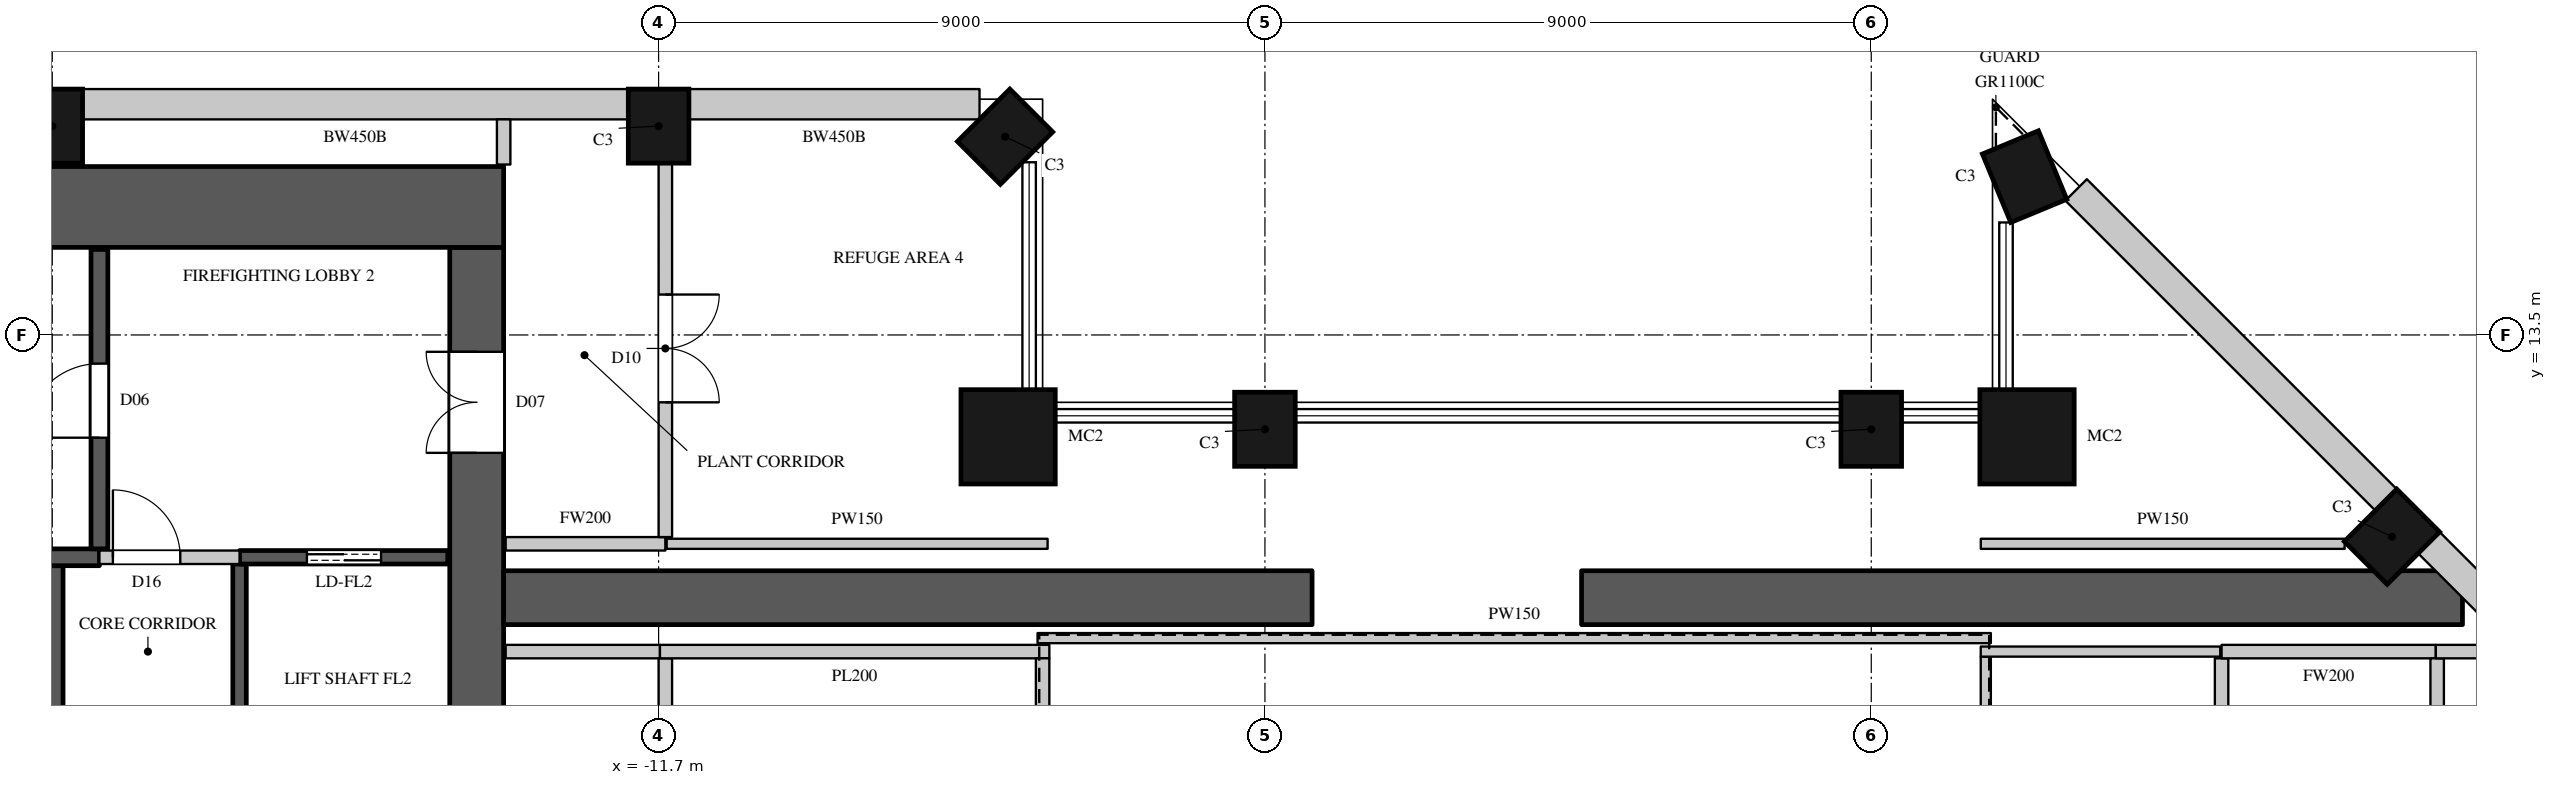
"""IFC4 building model, lengths in metres.
Left out: names, types, materials, properties, quantities, classifications, styles, units other than length and angle.
Written with IfcOpenShell. Run it as: python <this file> out.ifc"""

import sys

from ifc_helpers import new_model, si_unit, direction, frame, frame_2d, origin, origin_2d, place, context, subcontext, project, spatial, rectangle, circle, extrude, element, fill, save


model = new_model("IFC4")
c1 = context("Model", 3, precision=1e-05, world=origin(), true_north=direction((0.0, 1.0)))
c2 = subcontext(c1, "Body", "Model", "MODEL_VIEW")
j1 = project(units=[si_unit("LENGTHUNIT", "METRE"), si_unit("PLANEANGLEUNIT", "RADIAN")], contexts=[c1])
p1 = place(None, origin())
s1 = spatial("IfcSite", under=j1, at=p1, CompositionType="ELEMENT")
p2 = place(p1, origin())
s2 = spatial("IfcBuilding", under=s1, at=p2, CompositionType="ELEMENT")
p3 = place(p2, frame((0.0, 0.0, 238.4)))
s3 = spatial("IfcBuildingStorey", under=s2, at=p3, CompositionType="ELEMENT", Elevation=238.4)
for number, where, z_axis, x_axis in (
    (1, (14.029, 10.505, 0.0), (0.0, 0.0, 1.0), (-0.707, 0.707, 0.0)),
    (2, (8.576, 15.85, 0.0), (0.0, 0.0, 1.0), (-0.924, -0.383, 0.0)),
):
    element("IfcColumn", number, at=place(p3, frame(where, z_axis=z_axis, x_axis=x_axis)), inside=s3, PredefinedType="COLUMN", context=c2, shape_type="SweptSolid", body=[
        extrude(rectangle(XDim=0.9, YDim=1.1, at=origin_2d()), origin(), (0.0, 0.0, 1.0), 5.0),
    ])
p4 = place(p3, frame((8.612, 11.988, 0.0), z_axis=(0.0, 0.0, 1.0), x_axis=(1.0, 0.0, 0.0)))
e3 = element("IfcColumn", 3, at=p4, inside=s3, PredefinedType="COLUMN", context=c2, shape_type="SweptSolid", body=[
    extrude(circle(Radius=0.7, at=origin_2d()), origin(), (0.0, 0.0, 1.0), 5.0),
])
for number, where, z_axis, x_axis in (
    (4, (6.3, 12.1, 0.0), (0.0, 0.0, 1.0), (-1.0, 0.0, 0.0)),
    (5, (-2.7, 12.1, 0.0), (0.0, 0.0, 1.0), (-1.0, 0.0, 0.0)),
):
    element("IfcColumn", number, at=place(p3, frame(where, z_axis=z_axis, x_axis=x_axis)), inside=s3, PredefinedType="COLUMN", context=c2, shape_type="SweptSolid", body=[
        extrude(rectangle(XDim=0.9, YDim=1.1, at=origin_2d()), origin(), (0.0, 0.0, 1.0), 5.0),
    ])
p5 = place(p3, frame((-6.512, 11.988, 0.0), z_axis=(0.0, 0.0, 1.0), x_axis=(1.0, 0.0, 0.0)))
e6 = element("IfcColumn", 6, at=p5, inside=s3, PredefinedType="COLUMN", context=c2, shape_type="SweptSolid", body=[
    extrude(circle(Radius=0.7, at=origin_2d()), origin(), (0.0, 0.0, 1.0), 5.0),
])
for number, where, z_axis, x_axis in (
    (7, (-6.557, 16.443, 0.0), (0.0, 0.0, 1.0), (-0.707, 0.707, 0.0)),
    (8, (-11.7, 16.6, 0.0), (0.0, 0.0, 1.0), (-1.0, 0.0, 0.0)),
    (9, (-20.7, 16.6, 0.0), (0.0, 0.0, 1.0), (-1.0, 0.0, 0.0)),
):
    element("IfcColumn", number, at=place(p3, frame(where, z_axis=z_axis, x_axis=x_axis)), inside=s3, PredefinedType="COLUMN", context=c2, shape_type="SweptSolid", body=[
        extrude(rectangle(XDim=0.9, YDim=1.1, at=origin_2d()), origin(), (0.0, 0.0, 1.0), 5.0),
    ])
p6 = place(p3, frame((-14.0, 9.6, 0.0), z_axis=(0.0, 0.0, 1.0), x_axis=(1.0, 0.0, 0.0)))
e10 = element("IfcWall", 10, at=p6, inside=s3, PredefinedType="SOLIDWALL", context=c2, shape_type="SweptSolid", body=[
    extrude(rectangle(XDim=12.0, YDim=0.8, at=frame_2d((6.0, 0.0))), origin(), (0.0, 0.0, 1.0), 4.7),
])
p7 = place(p3, frame((2.0, 9.6, 0.0), z_axis=(0.0, 0.0, 1.0), x_axis=(1.0, 0.0, 0.0)))
e11 = element("IfcWall", 11, at=p7, inside=s3, PredefinedType="SOLIDWALL", context=c2, shape_type="SweptSolid", body=[
    extrude(rectangle(XDim=13.076, YDim=0.8, at=frame_2d((6.538, 0.0))), origin(), (0.0, 0.0, 1.0), 4.7),
])
p8 = place(p3, frame((19.615, 5.379, 0.0), z_axis=(0.0, 0.0, 1.0), x_axis=(-0.707089646058, 0.7071239159, 0.0)))
e12 = element("IfcWall", 12, at=p8, inside=s3, PredefinedType="SOLIDWALL", context=c2, shape_type="SweptSolid", body=[
    extrude(rectangle(XDim=7.124, YDim=0.45, at=frame_2d((3.562, 0.0))), origin(), (0.0, 0.0, 1.0), 4.7),
])
p9 = place(p3, frame((13.941, 11.053, 0.0), z_axis=(0.0, 0.0, 1.0), x_axis=(-0.707106781187, 0.707106781187, 0.0)))
e13 = element("IfcWall", 13, at=p9, inside=s3, PredefinedType="SOLIDWALL", context=c2, shape_type="SweptSolid", body=[
    extrude(rectangle(XDim=6.505, YDim=0.45, at=frame_2d((3.252, 0.0))), origin(), (0.0, 0.0, 1.0), 4.7),
])
p10 = place(p3, frame((-6.936, 16.925, 0.0), z_axis=(0.0, 0.0, 1.0), x_axis=(-1.0, 0.0, 0.0)))
e14 = element("IfcWall", 14, at=p10, inside=s3, PredefinedType="SOLIDWALL", context=c2, shape_type="SweptSolid", body=[
    extrude(rectangle(XDim=4.314, YDim=0.45, at=frame_2d((2.157, 0.0))), origin(), (0.0, 0.0, 1.0), 4.7),
])
p11 = place(p3, frame((-12.15, 16.925, 0.0), z_axis=(0.0, 0.0, 1.0), x_axis=(-1.0, 0.0, 0.0)))
e15 = element("IfcWall", 15, at=p11, inside=s3, PredefinedType="SOLIDWALL", context=c2, shape_type="SweptSolid", body=[
    extrude(rectangle(XDim=8.1, YDim=0.45, at=frame_2d((4.05, 0.0))), origin(), (0.0, 0.0, 1.0), 4.7),
])
p12 = place(p3, frame((-30.0, 15.4, 0.0), z_axis=(0.0, 0.0, 1.0), x_axis=(1.0, 0.0, 0.0)))
e16 = element("IfcWall", 16, at=p12, inside=s3, PredefinedType="SHEAR", context=c2, shape_type="SweptSolid", body=[
    extrude(rectangle(XDim=16.0, YDim=1.2, at=frame_2d((8.0, 0.0))), origin(), (0.0, 0.0, 1.0), 5.0),
])
p13 = place(p3, frame((-14.4, -14.8, 0.0), z_axis=(0.0, 0.0, 1.0), x_axis=(0.0, 1.0, 0.0)))
e17 = element("IfcWall", 17, at=p13, inside=s3, PredefinedType="SHEAR", context=c2, shape_type="SweptSolid", body=[
    extrude(rectangle(XDim=29.6, YDim=0.8, at=frame_2d((14.8, 0.0))), origin(), (0.0, 0.0, 1.0), 5.0),
])
p14 = place(p13, frame((1.55, 0.0, 0.0)))
e18 = element("IfcOpeningElement", 18, at=p14, cuts=e17, PredefinedType="OPENING", context=c2, shape_type="SweptSolid", body=[
    extrude(rectangle(XDim=1.5, YDim=2.4, at=frame_2d((0.75, 1.2))), frame((0.0, 0.41, 0.0), z_axis=(0.0, -1.0, 0.0), x_axis=(1.0, 0.0, 0.0)), (0.0, 0.0, 1.0), 0.82),
])
p15 = place(p13, frame((26.55, 0.0, 0.0)))
e19 = element("IfcOpeningElement", 19, at=p15, cuts=e17, PredefinedType="OPENING", context=c2, shape_type="SweptSolid", body=[
    extrude(rectangle(XDim=1.5, YDim=2.4, at=frame_2d((0.75, 1.2))), frame((0.0, 0.41, 0.0), z_axis=(0.0, -1.0, 0.0), x_axis=(1.0, 0.0, 0.0)), (0.0, 0.0, 1.0), 0.82),
])
p16 = place(p13, frame((8.45, 0.0, 0.0)))
e20 = element("IfcOpeningElement", 20, at=p16, cuts=e17, PredefinedType="OPENING", context=c2, shape_type="SweptSolid", body=[
    extrude(rectangle(XDim=1.5, YDim=2.4, at=frame_2d((0.75, 1.2))), frame((0.0, 0.41, 0.0), z_axis=(0.0, -1.0, 0.0), x_axis=(1.0, 0.0, 0.0)), (0.0, 0.0, 1.0), 0.82),
])
p17 = place(p13, frame((19.65, 0.0, 0.0)))
e21 = element("IfcOpeningElement", 21, at=p17, cuts=e17, PredefinedType="OPENING", context=c2, shape_type="SweptSolid", body=[
    extrude(rectangle(XDim=1.5, YDim=2.4, at=frame_2d((0.75, 1.2))), frame((0.0, 0.41, 0.0), z_axis=(0.0, -1.0, 0.0), x_axis=(1.0, 0.0, 0.0)), (0.0, 0.0, 1.0), 0.82),
])
p18 = place(p13, frame((14.5, 0.0, 0.0)))
e22 = element("IfcOpeningElement", 22, at=p18, cuts=e17, PredefinedType="OPENING", context=c2, shape_type="SweptSolid", body=[
    extrude(rectangle(XDim=0.6, YDim=2.0, at=frame_2d((0.3, 1.0))), frame((0.0, 0.41, 0.0), z_axis=(0.0, -1.0, 0.0), x_axis=(1.0, 0.0, 0.0)), (0.0, 0.0, 1.0), 0.82),
])
p19 = place(p3, frame((-20.0, 10.2, 0.0), z_axis=(0.0, 0.0, 1.0), x_axis=(1.0, 0.0, 0.0)))
e23 = element("IfcWall", 23, at=p19, inside=s3, PredefinedType="PARTITIONING", context=c2, shape_type="SweptSolid", body=[
    extrude(rectangle(XDim=2.08, YDim=0.2, at=frame_2d((1.04, 0.0))), origin(), (0.0, 0.0, 1.0), 4.7),
])
p20 = place(p19, frame((0.2, 0.0, 0.0)))
e24 = element("IfcOpeningElement", 24, at=p20, cuts=e23, PredefinedType="OPENING", context=c2, shape_type="SweptSolid", body=[
    extrude(rectangle(XDim=1.0, YDim=2.2, at=frame_2d((0.5, 1.1))), frame((0.0, 0.11, 0.0), z_axis=(0.0, -1.0, 0.0), x_axis=(1.0, 0.0, 0.0)), (0.0, 0.0, 1.0), 0.22),
])
p21 = place(p3, frame((-13.97, 8.8, 0.0), z_axis=(0.0, 0.0, 1.0), x_axis=(1.0, 0.0, 0.0)))
e25 = element("IfcWall", 25, at=p21, inside=s3, PredefinedType="PARTITIONING", context=c2, shape_type="SweptSolid", body=[
    extrude(rectangle(XDim=2.29, YDim=0.2, at=frame_2d((1.145, 0.0))), origin(), (0.0, 0.0, 1.0), 4.7),
])
p22 = place(p3, frame((-13.97, 10.4, 0.0), z_axis=(0.0, 0.0, 1.0), x_axis=(1.0, 0.0, 0.0)))
e26 = element("IfcWall", 26, at=p22, inside=s3, PredefinedType="PARTITIONING", context=c2, shape_type="SweptSolid", body=[
    extrude(rectangle(XDim=2.37, YDim=0.2, at=frame_2d((1.185, 0.0))), origin(), (0.0, 0.0, 1.0), 4.7),
])
p23 = place(p3, frame((-11.6, 10.5, 0.0), z_axis=(0.0, 0.0, 1.0), x_axis=(0.0, 1.0, 0.0)))
e27 = element("IfcWall", 27, at=p23, inside=s3, PredefinedType="PARTITIONING", context=c2, shape_type="SweptSolid", body=[
    extrude(rectangle(XDim=5.55, YDim=0.2, at=frame_2d((2.775, 0.0))), origin(), (0.0, 0.0, 1.0), 4.7),
])
p24 = place(p23, frame((2.0, 0.0, 0.0)))
e28 = element("IfcOpeningElement", 28, at=p24, cuts=e27, PredefinedType="OPENING", context=c2, shape_type="SweptSolid", body=[
    extrude(rectangle(XDim=1.6, YDim=2.4, at=frame_2d((0.8, 1.2))), frame((0.0, 0.11, 0.0), z_axis=(0.0, -1.0, 0.0), x_axis=(1.0, 0.0, 0.0)), (0.0, 0.0, 1.0), 0.22),
])
p25 = place(p3, frame((11.5, -8.7, 0.0), z_axis=(0.0, 0.0, 1.0), x_axis=(0.0, 1.0, 0.0)))
e29 = element("IfcWall", 29, at=p25, inside=s3, PredefinedType="PARTITIONING", context=c2, shape_type="SweptSolid", body=[
    extrude(rectangle(XDim=17.4, YDim=0.2, at=frame_2d((8.7, 0.0))), origin(), (0.0, 0.0, 1.0), 4.7),
])
p26 = place(p25, frame((7.9, 0.0, 0.0)))
e30 = element("IfcOpeningElement", 30, at=p26, cuts=e29, PredefinedType="OPENING", context=c2, shape_type="SweptSolid", body=[
    extrude(rectangle(XDim=1.6, YDim=2.4, at=frame_2d((0.8, 1.2))), frame((0.0, 0.11, 0.0), z_axis=(0.0, -1.0, 0.0), x_axis=(1.0, 0.0, 0.0)), (0.0, 0.0, 1.0), 0.22),
])
p27 = place(p3, frame((11.5, 8.8, 0.0), z_axis=(0.0, 0.0, 1.0), x_axis=(1.0, 0.0, 0.0)))
e31 = element("IfcWall", 31, at=p27, inside=s3, PredefinedType="PARTITIONING", context=c2, shape_type="SweptSolid", body=[
    extrude(rectangle(XDim=3.18, YDim=0.2, at=frame_2d((1.59, 0.0))), origin(), (0.0, 0.0, 1.0), 4.7),
])
p28 = place(p3, frame((-11.58, 10.4, 0.0), z_axis=(0.0, 0.0, 1.0), x_axis=(1.0, 0.0, 0.0)))
e32 = element("IfcWall", 32, at=p28, inside=s3, PredefinedType="PARTITIONING", context=c2, shape_type="SweptSolid", body=[
    extrude(rectangle(XDim=5.654, YDim=0.15, at=frame_2d((2.827, 0.0))), origin(), (0.0, 0.0, 1.0), 4.7),
])
p29 = place(p3, frame((-6.075, 9.0, 0.0), z_axis=(0.0, 0.0, 1.0), x_axis=(1.0, 0.0, 0.0)))
e33 = element("IfcWall", 33, at=p29, inside=s3, PredefinedType="PARTITIONING", context=c2, shape_type="SweptSolid", body=[
    extrude(rectangle(XDim=14.15, YDim=0.15, at=frame_2d((7.075, 0.0))), origin(), (0.0, 0.0, 1.0), 4.7),
])
p30 = place(p3, frame((8.0, -8.725, 0.0), z_axis=(0.0, 0.0, 1.0), x_axis=(0.0, 1.0, 0.0)))
e34 = element("IfcWall", 34, at=p30, inside=s3, PredefinedType="PARTITIONING", context=c2, shape_type="SweptSolid", body=[
    extrude(rectangle(XDim=17.45, YDim=0.15, at=frame_2d((8.725, 0.0))), origin(), (0.0, 0.0, 1.0), 4.7),
])
p31 = place(p3, frame((7.925, 8.8, 0.0), z_axis=(0.0, 0.0, 1.0), x_axis=(1.0, 0.0, 0.0)))
e35 = element("IfcWall", 35, at=p31, inside=s3, PredefinedType="PARTITIONING", context=c2, shape_type="SweptSolid", body=[
    extrude(rectangle(XDim=3.555, YDim=0.15, at=frame_2d((1.777, 0.0))), origin(), (0.0, 0.0, 1.0), 4.7),
])
p32 = place(p3, frame((7.926, 10.4, 0.0), z_axis=(0.0, 0.0, 1.0), x_axis=(1.0, 0.0, 0.0)))
e36 = element("IfcWall", 36, at=p32, inside=s3, PredefinedType="PARTITIONING", context=c2, shape_type="SweptSolid", body=[
    extrude(rectangle(XDim=5.4, YDim=0.15, at=frame_2d((2.7, 0.0))), origin(), (0.0, 0.0, 1.0), 4.7),
])
p33 = place(p3, frame((-14.0, 16.03, 0.0), z_axis=(0.0, 0.0, 1.0), x_axis=(0.0, 1.0, 0.0)))
e37 = element("IfcWall", 37, at=p33, inside=s3, PredefinedType="PARTITIONING", context=c2, shape_type="SweptSolid", body=[
    extrude(rectangle(XDim=0.67, YDim=0.2, at=frame_2d((0.335, 0.0))), origin(), (0.0, 0.0, 1.0), 4.7),
])
p34 = place(p3, frame((-11.6, -8.7, 0.0), z_axis=(0.0, 0.0, 1.0), x_axis=(0.0, 1.0, 0.0)))
e38 = element("IfcWall", 38, at=p34, inside=s3, PredefinedType="PARTITIONING", context=c2, shape_type="SweptSolid", body=[
    extrude(rectangle(XDim=17.4, YDim=0.2, at=frame_2d((8.7, 0.0))), origin(), (0.0, 0.0, 1.0), 4.15),
])
p35 = place(p34, frame((3.5, 0.0, 0.0)))
e39 = element("IfcOpeningElement", 39, at=p35, cuts=e38, PredefinedType="OPENING", context=c2, shape_type="SweptSolid", body=[
    extrude(rectangle(XDim=1.8, YDim=2.4, at=frame_2d((0.9, 1.2))), frame((0.0, 0.11, 0.0), z_axis=(0.0, -1.0, 0.0), x_axis=(1.0, 0.0, 0.0)), (0.0, 0.0, 1.0), 0.22),
])
p36 = place(p34, frame((12.05, 0.0, 0.0)))
e40 = element("IfcOpeningElement", 40, at=p36, cuts=e38, PredefinedType="OPENING", context=c2, shape_type="SweptSolid", body=[
    extrude(rectangle(XDim=1.8, YDim=2.4, at=frame_2d((0.9, 1.2))), frame((0.0, 0.11, 0.0), z_axis=(0.0, -1.0, 0.0), x_axis=(1.0, 0.0, 0.0)), (0.0, 0.0, 1.0), 0.22),
])
p37 = place(p3, frame((-11.68, 8.8, 0.0), z_axis=(0.0, 0.0, 1.0), x_axis=(1.0, 0.0, 0.0)))
e41 = element("IfcWall", 41, at=p37, inside=s3, PredefinedType="PARTITIONING", context=c2, shape_type="SweptSolid", body=[
    extrude(rectangle(XDim=5.78, YDim=0.2, at=frame_2d((2.89, 0.0))), origin(), (0.0, 0.0, 1.0), 4.7),
])
p38 = place(p3, frame((-6.0, 0.02, 0.0), z_axis=(0.0, 0.0, 1.0), x_axis=(0.0, 1.0, 0.0)))
e42 = element("IfcWall", 42, at=p38, inside=s3, PredefinedType="PARTITIONING", context=c2, shape_type="SweptSolid", body=[
    extrude(rectangle(XDim=8.68, YDim=0.2, at=frame_2d((4.34, 0.0))), origin(), (0.0, 0.0, 1.0), 4.7),
])
p39 = place(p3, frame((14.7, 4.75, 0.0), z_axis=(0.0, 0.0, 1.0), x_axis=(0.0, 1.0, 0.0)))
e43 = element("IfcWall", 43, at=p39, inside=s3, PredefinedType="PARTITIONING", context=c2, shape_type="SweptSolid", body=[
    extrude(rectangle(XDim=3.95, YDim=0.2, at=frame_2d((1.975, 0.0))), origin(), (0.0, 0.0, 1.0), 4.7),
])
p40 = place(p39, frame((1.05, 0.0, 0.0)))
e44 = element("IfcOpeningElement", 44, at=p40, cuts=e43, PredefinedType="OPENING", context=c2, shape_type="SweptSolid", body=[
    extrude(rectangle(XDim=1.8, YDim=2.4, at=frame_2d((0.9, 1.2))), frame((0.0, 0.11, 0.0), z_axis=(0.0, -1.0, 0.0), x_axis=(1.0, 0.0, 0.0)), (0.0, 0.0, 1.0), 0.22),
])
p41 = place(p3, frame((14.68, 8.8, 0.0), z_axis=(0.0, 0.0, 1.0), x_axis=(1.0, 0.0, 0.0)))
e45 = element("IfcWall", 45, at=p41, inside=s3, PredefinedType="PARTITIONING", context=c2, shape_type="SweptSolid", body=[
    extrude(rectangle(XDim=1.196, YDim=0.2, at=frame_2d((0.598, 0.0))), origin(), (0.0, 0.0, 1.0), 4.7),
])
p42 = place(p3, frame((-20.64, 7.5, 0.0), z_axis=(0.0, 0.0, 1.0), x_axis=(0.0, 1.0, 0.0)))
e46 = element("IfcWall", 46, at=p42, inside=s3, PredefinedType="SHEAR", context=c2, shape_type="SweptSolid", body=[
    extrude(rectangle(XDim=2.575, YDim=0.2, at=frame_2d((1.288, 0.0))), origin(), (0.0, 0.0, 1.0), 4.7),
])
p43 = place(p3, frame((-17.92, 7.5, 0.0), z_axis=(0.0, 0.0, 1.0), x_axis=(0.0, 1.0, 0.0)))
e47 = element("IfcWall", 47, at=p43, inside=s3, PredefinedType="SHEAR", context=c2, shape_type="SweptSolid", body=[
    extrude(rectangle(XDim=2.6, YDim=0.2, at=frame_2d((1.3, 0.0))), origin(), (0.0, 0.0, 1.0), 4.7),
])
p44 = place(p3, frame((-17.92, 10.2, 0.0), z_axis=(0.0, 0.0, 1.0), x_axis=(1.0, 0.0, 0.0)))
e48 = element("IfcWall", 48, at=p44, inside=s3, PredefinedType="SHEAR", context=c2, shape_type="SweptSolid", body=[
    extrude(rectangle(XDim=3.09, YDim=0.2, at=frame_2d((1.545, 0.0))), origin(), (0.0, 0.0, 1.0), 4.7),
])
p45 = place(p44, frame((1.0, 0.0, 0.0)))
e49 = element("IfcOpeningElement", 49, at=p45, cuts=e48, PredefinedType="OPENING", context=c2, shape_type="SweptSolid", body=[
    extrude(rectangle(XDim=1.1, YDim=2.2, at=frame_2d((0.55, 1.1))), frame((0.0, 0.11, 0.0), z_axis=(0.0, -1.0, 0.0), x_axis=(1.0, 0.0, 0.0)), (0.0, 0.0, 1.0), 0.22),
])
p46 = place(p3, frame((-28.81, 10.2, 0.0), z_axis=(0.0, 0.0, 1.0), x_axis=(1.0, 0.0, 0.0)))
e50 = element("IfcWall", 50, at=p46, inside=s3, PredefinedType="SHEAR", context=c2, shape_type="SweptSolid", body=[
    extrude(rectangle(XDim=8.81, YDim=0.25, at=frame_2d((4.405, 0.0))), origin(), (0.0, 0.0, 1.0), 4.7),
])
p47 = place(p3, frame((-20.0, 10.325, 0.0), z_axis=(0.0, 0.0, 1.0), x_axis=(0.0, 1.0, 0.0)))
e51 = element("IfcWall", 51, at=p47, inside=s3, PredefinedType="SHEAR", context=c2, shape_type="SweptSolid", body=[
    extrude(rectangle(XDim=4.445, YDim=0.25, at=frame_2d((2.223, 0.0))), origin(), (0.0, 0.0, 1.0), 4.7),
])
p48 = place(p47, frame((1.65, 0.0, 0.0)))
e52 = element("IfcOpeningElement", 52, at=p48, cuts=e51, PredefinedType="OPENING", context=c2, shape_type="SweptSolid", body=[
    extrude(rectangle(XDim=1.1, YDim=2.2, at=frame_2d((0.55, 1.1))), frame((0.0, 0.135, 0.0), z_axis=(0.0, -1.0, 0.0), x_axis=(1.0, 0.0, 0.0)), (0.0, 0.0, 1.0), 0.27),
])
p49 = place(p48, origin())
e53 = element("IfcDoor", 53, at=p49, inside=s3, OperationType="SINGLE_SWING_LEFT", PredefinedType="DOOR", context=c2, shape_type="SweptSolid", body=[
    extrude(rectangle(XDim=1.1, YDim=2.2, at=frame_2d((0.55, 1.1))), frame((0.0, 0.025, 0.0), z_axis=(0.0, -1.0, 0.0), x_axis=(1.0, 0.0, 0.0)), (0.0, 0.0, 1.0), 0.05),
])
fill(e52, e53)
p50 = place(p20, origin())
e54 = element("IfcDoor", 54, at=p50, inside=s3, OperationType="SINGLE_SWING_LEFT", PredefinedType="DOOR", context=c2, shape_type="SweptSolid", body=[
    extrude(rectangle(XDim=1.0, YDim=2.2, at=frame_2d((0.5, 1.1))), frame((0.0, 0.025, 0.0), z_axis=(0.0, -1.0, 0.0), x_axis=(1.0, 0.0, 0.0)), (0.0, 0.0, 1.0), 0.05),
])
fill(e24, e54)
p51 = place(p45, origin())
e55 = element("IfcDoor", 55, at=p51, inside=s3, OperationType="DOUBLE_DOOR_SLIDING", PredefinedType="DOOR", context=c2, shape_type="SweptSolid", body=[
    extrude(rectangle(XDim=1.1, YDim=2.2, at=frame_2d((0.55, 1.1))), frame((0.0, 0.025, 0.0), z_axis=(0.0, -1.0, 0.0), x_axis=(1.0, 0.0, 0.0)), (0.0, 0.0, 1.0), 0.05),
])
fill(e49, e55)
p52 = place(p24, origin())
e56 = element("IfcDoor", 56, at=p52, inside=s3, OperationType="DOUBLE_DOOR_SINGLE_SWING", PredefinedType="DOOR", context=c2, shape_type="SweptSolid", body=[
    extrude(rectangle(XDim=1.6, YDim=2.4, at=frame_2d((0.8, 1.2))), frame((0.0, 0.025, 0.0), z_axis=(0.0, -1.0, 0.0), x_axis=(1.0, 0.0, 0.0)), (0.0, 0.0, 1.0), 0.05),
])
fill(e28, e56)
p53 = place(p15, origin())
e57 = element("IfcDoor", 57, at=p53, inside=s3, OperationType="DOUBLE_DOOR_SINGLE_SWING", PredefinedType="DOOR", context=c2, shape_type="SweptSolid", body=[
    extrude(rectangle(XDim=1.5, YDim=2.4, at=frame_2d((0.75, 1.2))), frame((0.0, 0.395, 0.0), z_axis=(0.0, -1.0, 0.0), x_axis=(1.0, 0.0, 0.0)), (0.0, 0.0, 1.0), 0.05),
])
fill(e19, e57)
save(model, sys.argv[1])
